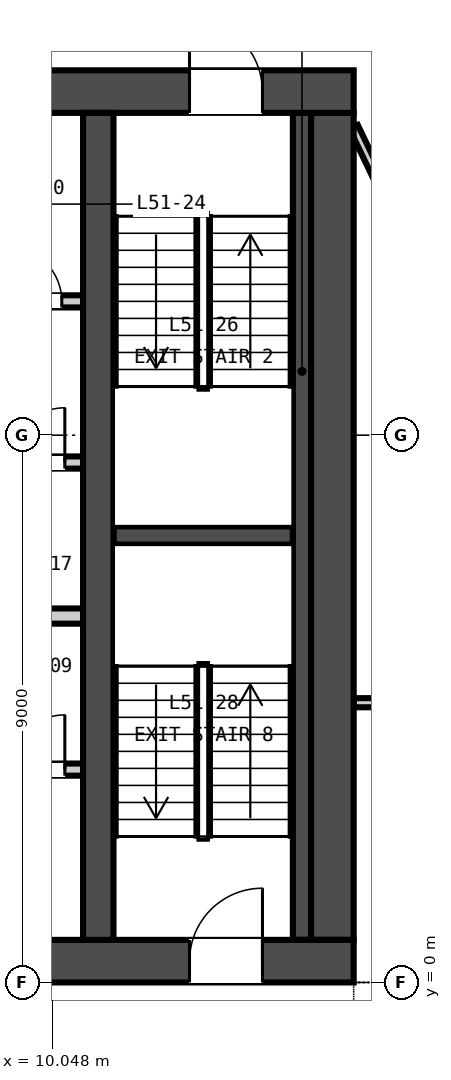
"""IFC4 building model, lengths in metres.
Left out: names, types, materials, properties, quantities, classifications, styles, units other than length and angle.
Written with IfcOpenShell. Run it as: python <this file> out.ifc"""

import sys

from ifc_helpers import new_model, si_unit, direction, frame, frame_2d, origin, place, context, subcontext, project, spatial, rectangle, extrude, element, fill, save


model = new_model("IFC4")
c1 = context("Model", 3, precision=1e-05, world=origin(), true_north=direction((0.0, 1.0)))
c2 = subcontext(c1, "Body", "Model", "MODEL_VIEW")
j1 = project(units=[si_unit("LENGTHUNIT", "METRE"), si_unit("PLANEANGLEUNIT", "RADIAN")], contexts=[c1])
p1 = place(None, origin())
s1 = spatial("IfcSite", under=j1, at=p1, CompositionType="ELEMENT")
p2 = place(p1, origin())
s2 = spatial("IfcBuilding", under=s1, at=p2, CompositionType="ELEMENT")
p3 = place(p2, frame((0.0, 0.0, 203.65)))
s3 = spatial("IfcBuildingStorey", under=s2, at=p3, CompositionType="ELEMENT", Elevation=203.65)
p4 = place(p3, frame((-15.0, 0.35, -0.15), z_axis=(0.0, 0.0, 1.0), x_axis=(1.0, 0.0, 0.0)))
e1 = element("IfcWall", 1, at=p4, inside=s3, PredefinedType="SOLIDWALL", context=c2, shape_type="SweptSolid", body=[
    extrude(rectangle(XDim=30.0, YDim=0.7, at=frame_2d((15.0, 0.0))), origin(), (0.0, 0.0, 1.0), 3.5),
])
p5 = place(p4, frame((5.8, 0.0, 0.15)))
e2 = element("IfcOpeningElement", 2, at=p5, cuts=e1, PredefinedType="OPENING", context=c2, shape_type="SweptSolid", body=[
    extrude(rectangle(XDim=2.4, YDim=2.4, at=frame_2d((1.2, 1.2))), frame((0.0, 0.36, 0.0), z_axis=(0.0, -1.0, 0.0), x_axis=(1.0, 0.0, 0.0)), (0.0, 0.0, 1.0), 0.72),
])
p6 = place(p4, frame((13.8, 0.0, 0.15)))
e3 = element("IfcOpeningElement", 3, at=p6, cuts=e1, PredefinedType="OPENING", context=c2, shape_type="SweptSolid", body=[
    extrude(rectangle(XDim=2.4, YDim=2.4, at=frame_2d((1.2, 1.2))), frame((0.0, 0.36, 0.0), z_axis=(0.0, -1.0, 0.0), x_axis=(1.0, 0.0, 0.0)), (0.0, 0.0, 1.0), 0.72),
])
p7 = place(p4, frame((21.8, 0.0, 0.15)))
e4 = element("IfcOpeningElement", 4, at=p7, cuts=e1, PredefinedType="OPENING", context=c2, shape_type="SweptSolid", body=[
    extrude(rectangle(XDim=2.4, YDim=2.4, at=frame_2d((1.2, 1.2))), frame((0.0, 0.36, 0.0), z_axis=(0.0, -1.0, 0.0), x_axis=(1.0, 0.0, 0.0)), (0.0, 0.0, 1.0), 0.72),
])
p8 = place(p4, frame((1.5, 0.0, 0.15)))
e5 = element("IfcOpeningElement", 5, at=p8, cuts=e1, PredefinedType="OPENING", context=c2, shape_type="SweptSolid", body=[
    extrude(rectangle(XDim=1.2, YDim=2.1, at=frame_2d((0.6, 1.05))), frame((0.0, 0.36, 0.0), z_axis=(0.0, -1.0, 0.0), x_axis=(1.0, 0.0, 0.0)), (0.0, 0.0, 1.0), 0.72),
])
p9 = place(p4, frame((27.3, 0.0, 0.15)))
e6 = element("IfcOpeningElement", 6, at=p9, cuts=e1, PredefinedType="OPENING", context=c2, shape_type="SweptSolid", body=[
    extrude(rectangle(XDim=1.2, YDim=2.1, at=frame_2d((0.6, 1.05))), frame((0.0, 0.36, 0.0), z_axis=(0.0, -1.0, 0.0), x_axis=(1.0, 0.0, 0.0)), (0.0, 0.0, 1.0), 0.72),
])
p10 = place(p3, frame((-15.0, 14.65, -0.15), z_axis=(0.0, 0.0, 1.0), x_axis=(1.0, 0.0, 0.0)))
e7 = element("IfcWall", 7, at=p10, inside=s3, PredefinedType="SOLIDWALL", context=c2, shape_type="SweptSolid", body=[
    extrude(rectangle(XDim=30.0, YDim=0.7, at=frame_2d((15.0, 0.0))), origin(), (0.0, 0.0, 1.0), 3.5),
])
p11 = place(p10, frame((9.25, 0.0, 0.15)))
e8 = element("IfcOpeningElement", 8, at=p11, cuts=e7, PredefinedType="OPENING", context=c2, shape_type="SweptSolid", body=[
    extrude(rectangle(XDim=1.5, YDim=2.1, at=frame_2d((0.75, 1.05))), frame((0.0, 0.36, 0.0), z_axis=(0.0, -1.0, 0.0), x_axis=(1.0, 0.0, 0.0)), (0.0, 0.0, 1.0), 0.72),
])
p12 = place(p10, frame((19.4, 0.0, 0.15)))
e9 = element("IfcOpeningElement", 9, at=p12, cuts=e7, PredefinedType="OPENING", context=c2, shape_type="SweptSolid", body=[
    extrude(rectangle(XDim=1.5, YDim=2.1, at=frame_2d((0.75, 1.05))), frame((0.0, 0.36, 0.0), z_axis=(0.0, -1.0, 0.0), x_axis=(1.0, 0.0, 0.0)), (0.0, 0.0, 1.0), 0.72),
])
p13 = place(p10, frame((1.5, 0.0, 0.15)))
e10 = element("IfcOpeningElement", 10, at=p13, cuts=e7, PredefinedType="OPENING", context=c2, shape_type="SweptSolid", body=[
    extrude(rectangle(XDim=1.2, YDim=2.1, at=frame_2d((0.6, 1.05))), frame((0.0, 0.36, 0.0), z_axis=(0.0, -1.0, 0.0), x_axis=(1.0, 0.0, 0.0)), (0.0, 0.0, 1.0), 0.72),
])
p14 = place(p10, frame((27.3, 0.0, 0.15)))
e11 = element("IfcOpeningElement", 11, at=p14, cuts=e7, PredefinedType="OPENING", context=c2, shape_type="SweptSolid", body=[
    extrude(rectangle(XDim=1.2, YDim=2.1, at=frame_2d((0.6, 1.05))), frame((0.0, 0.36, 0.0), z_axis=(0.0, -1.0, 0.0), x_axis=(1.0, 0.0, 0.0)), (0.0, 0.0, 1.0), 0.72),
])
p15 = place(p3, frame((14.65, 0.7, -0.15), z_axis=(0.0, 0.0, 1.0), x_axis=(0.0, 1.0, 0.0)))
e12 = element("IfcWall", 12, at=p15, inside=s3, PredefinedType="SOLIDWALL", context=c2, shape_type="SweptSolid", body=[
    extrude(rectangle(XDim=13.6, YDim=0.7, at=frame_2d((6.8, 0.0))), origin(), (0.0, 0.0, 1.0), 3.5),
])
p16 = place(p3, frame((10.8, 0.7, -0.15), z_axis=(0.0, 0.0, 1.0), x_axis=(0.0, 1.0, 0.0)))
e13 = element("IfcWall", 13, at=p16, inside=s3, PredefinedType="SOLIDWALL", context=c2, shape_type="SweptSolid", body=[
    extrude(rectangle(XDim=13.6, YDim=0.5, at=frame_2d((6.8, 0.0))), origin(), (0.0, 0.0, 1.0), 3.5),
])
p17 = place(p3, frame((-10.55, 3.5, 0.0), z_axis=(0.0, 0.0, 1.0), x_axis=(1.0, 0.0, 0.0)))
e14 = element("IfcWall", 14, at=p17, inside=s3, PredefinedType="PARTITIONING", context=c2, shape_type="SweptSolid", body=[
    extrude(rectangle(XDim=21.1, YDim=0.2, at=frame_2d((10.55, 0.0))), origin(), (0.0, 0.0, 1.0), 3.35),
])
p18 = place(p17, frame((1.113, 0.0, 0.0)))
e15 = element("IfcOpeningElement", 15, at=p18, cuts=e14, PredefinedType="OPENING", context=c2, shape_type="SweptSolid", body=[
    extrude(rectangle(XDim=1.0, YDim=2.1, at=frame_2d((0.5, 1.05))), frame((0.0, 0.11, 0.0), z_axis=(0.0, -1.0, 0.0), x_axis=(1.0, 0.0, 0.0)), (0.0, 0.0, 1.0), 0.22),
])
p19 = place(p17, frame((5.15, 0.0, 0.0)))
e16 = element("IfcOpeningElement", 16, at=p19, cuts=e14, PredefinedType="OPENING", context=c2, shape_type="SweptSolid", body=[
    extrude(rectangle(XDim=1.0, YDim=2.1, at=frame_2d((0.5, 1.05))), frame((0.0, 0.11, 0.0), z_axis=(0.0, -1.0, 0.0), x_axis=(1.0, 0.0, 0.0)), (0.0, 0.0, 1.0), 0.22),
])
p20 = place(p17, frame((9.85, 0.0, 0.0)))
e17 = element("IfcOpeningElement", 17, at=p20, cuts=e14, PredefinedType="OPENING", context=c2, shape_type="SweptSolid", body=[
    extrude(rectangle(XDim=1.0, YDim=2.1, at=frame_2d((0.5, 1.05))), frame((0.0, 0.11, 0.0), z_axis=(0.0, -1.0, 0.0), x_axis=(1.0, 0.0, 0.0)), (0.0, 0.0, 1.0), 0.22),
])
p21 = place(p17, frame((13.4, 0.0, 0.0)))
e18 = element("IfcOpeningElement", 18, at=p21, cuts=e14, PredefinedType="OPENING", context=c2, shape_type="SweptSolid", body=[
    extrude(rectangle(XDim=1.0, YDim=2.1, at=frame_2d((0.5, 1.05))), frame((0.0, 0.11, 0.0), z_axis=(0.0, -1.0, 0.0), x_axis=(1.0, 0.0, 0.0)), (0.0, 0.0, 1.0), 0.22),
])
p22 = place(p17, frame((16.762, 0.0, 0.0)))
e19 = element("IfcOpeningElement", 19, at=p22, cuts=e14, PredefinedType="OPENING", context=c2, shape_type="SweptSolid", body=[
    extrude(rectangle(XDim=1.0, YDim=2.1, at=frame_2d((0.5, 1.05))), frame((0.0, 0.11, 0.0), z_axis=(0.0, -1.0, 0.0), x_axis=(1.0, 0.0, 0.0)), (0.0, 0.0, 1.0), 0.22),
])
p23 = place(p17, frame((19.9, 0.0, 0.0)))
e20 = element("IfcOpeningElement", 20, at=p23, cuts=e14, PredefinedType="OPENING", context=c2, shape_type="SweptSolid", body=[
    extrude(rectangle(XDim=0.9, YDim=2.1, at=frame_2d((0.45, 1.05))), frame((0.0, 0.11, 0.0), z_axis=(0.0, -1.0, 0.0), x_axis=(1.0, 0.0, 0.0)), (0.0, 0.0, 1.0), 0.22),
])
p24 = place(p3, frame((-10.55, 6.025, 0.0), z_axis=(0.0, 0.0, 1.0), x_axis=(1.0, 0.0, 0.0)))
e21 = element("IfcWall", 21, at=p24, inside=s3, PredefinedType="PARTITIONING", context=c2, shape_type="SweptSolid", body=[
    extrude(rectangle(XDim=21.1, YDim=0.25, at=frame_2d((10.55, 0.0))), origin(), (0.0, 0.0, 1.0), 3.35),
])
p25 = place(p3, frame((-10.55, 8.55, 0.0), z_axis=(0.0, 0.0, 1.0), x_axis=(1.0, 0.0, 0.0)))
e22 = element("IfcWall", 22, at=p25, inside=s3, PredefinedType="PARTITIONING", context=c2, shape_type="SweptSolid", body=[
    extrude(rectangle(XDim=21.1, YDim=0.2, at=frame_2d((10.55, 0.0))), origin(), (0.0, 0.0, 1.0), 3.35),
])
p26 = place(p25, frame((0.675, 0.0, 0.0)))
e23 = element("IfcOpeningElement", 23, at=p26, cuts=e22, PredefinedType="OPENING", context=c2, shape_type="SweptSolid", body=[
    extrude(rectangle(XDim=1.2, YDim=2.1, at=frame_2d((0.6, 1.05))), frame((0.0, 0.11, 0.0), z_axis=(0.0, -1.0, 0.0), x_axis=(1.0, 0.0, 0.0)), (0.0, 0.0, 1.0), 0.22),
])
p27 = place(p25, frame((3.475, 0.0, 0.0)))
e24 = element("IfcOpeningElement", 24, at=p27, cuts=e22, PredefinedType="OPENING", context=c2, shape_type="SweptSolid", body=[
    extrude(rectangle(XDim=1.2, YDim=2.1, at=frame_2d((0.6, 1.05))), frame((0.0, 0.11, 0.0), z_axis=(0.0, -1.0, 0.0), x_axis=(1.0, 0.0, 0.0)), (0.0, 0.0, 1.0), 0.22),
])
p28 = place(p25, frame((6.275, 0.0, 0.0)))
e25 = element("IfcOpeningElement", 25, at=p28, cuts=e22, PredefinedType="OPENING", context=c2, shape_type="SweptSolid", body=[
    extrude(rectangle(XDim=1.2, YDim=2.1, at=frame_2d((0.6, 1.05))), frame((0.0, 0.11, 0.0), z_axis=(0.0, -1.0, 0.0), x_axis=(1.0, 0.0, 0.0)), (0.0, 0.0, 1.0), 0.22),
])
p29 = place(p25, frame((9.075, 0.0, 0.0)))
e26 = element("IfcOpeningElement", 26, at=p29, cuts=e22, PredefinedType="OPENING", context=c2, shape_type="SweptSolid", body=[
    extrude(rectangle(XDim=1.2, YDim=2.1, at=frame_2d((0.6, 1.05))), frame((0.0, 0.11, 0.0), z_axis=(0.0, -1.0, 0.0), x_axis=(1.0, 0.0, 0.0)), (0.0, 0.0, 1.0), 0.22),
])
p30 = place(p25, frame((11.875, 0.0, 0.0)))
e27 = element("IfcOpeningElement", 27, at=p30, cuts=e22, PredefinedType="OPENING", context=c2, shape_type="SweptSolid", body=[
    extrude(rectangle(XDim=1.2, YDim=2.1, at=frame_2d((0.6, 1.05))), frame((0.0, 0.11, 0.0), z_axis=(0.0, -1.0, 0.0), x_axis=(1.0, 0.0, 0.0)), (0.0, 0.0, 1.0), 0.22),
])
p31 = place(p25, frame((14.675, 0.0, 0.0)))
e28 = element("IfcOpeningElement", 28, at=p31, cuts=e22, PredefinedType="OPENING", context=c2, shape_type="SweptSolid", body=[
    extrude(rectangle(XDim=1.2, YDim=2.1, at=frame_2d((0.6, 1.05))), frame((0.0, 0.11, 0.0), z_axis=(0.0, -1.0, 0.0), x_axis=(1.0, 0.0, 0.0)), (0.0, 0.0, 1.0), 0.22),
])
p32 = place(p25, frame((17.475, 0.0, 0.0)))
e29 = element("IfcOpeningElement", 29, at=p32, cuts=e22, PredefinedType="OPENING", context=c2, shape_type="SweptSolid", body=[
    extrude(rectangle(XDim=1.2, YDim=2.1, at=frame_2d((0.6, 1.05))), frame((0.0, 0.11, 0.0), z_axis=(0.0, -1.0, 0.0), x_axis=(1.0, 0.0, 0.0)), (0.0, 0.0, 1.0), 0.22),
])
p33 = place(p25, frame((19.9, 0.0, 0.0)))
e30 = element("IfcOpeningElement", 30, at=p33, cuts=e22, PredefinedType="OPENING", context=c2, shape_type="SweptSolid", body=[
    extrude(rectangle(XDim=0.9, YDim=2.1, at=frame_2d((0.45, 1.05))), frame((0.0, 0.11, 0.0), z_axis=(0.0, -1.0, 0.0), x_axis=(1.0, 0.0, 0.0)), (0.0, 0.0, 1.0), 0.22),
])
p34 = place(p3, frame((5.9, 11.2, 0.0), z_axis=(0.0, 0.0, 1.0), x_axis=(1.0, 0.0, 0.0)))
e31 = element("IfcWall", 31, at=p34, inside=s3, PredefinedType="PARTITIONING", context=c2, shape_type="SweptSolid", body=[
    extrude(rectangle(XDim=4.65, YDim=0.2, at=frame_2d((2.325, 0.0))), origin(), (0.0, 0.0, 1.0), 3.35),
])
p35 = place(p34, frame((3.4, 0.0, 0.0)))
e32 = element("IfcOpeningElement", 32, at=p35, cuts=e31, PredefinedType="OPENING", context=c2, shape_type="SweptSolid", body=[
    extrude(rectangle(XDim=0.9, YDim=2.1, at=frame_2d((0.45, 1.05))), frame((0.0, 0.11, 0.0), z_axis=(0.0, -1.0, 0.0), x_axis=(1.0, 0.0, 0.0)), (0.0, 0.0, 1.0), 0.22),
])
p36 = place(p3, frame((11.05, 7.35, 0.0), z_axis=(0.0, 0.0, 1.0), x_axis=(1.0, 0.0, 0.0)))
e33 = element("IfcWall", 33, at=p36, inside=s3, PredefinedType="SOLIDWALL", context=c2, shape_type="SweptSolid", body=[
    extrude(rectangle(XDim=2.95, YDim=0.3, at=frame_2d((1.475, 0.0))), origin(), (0.0, 0.0, 1.0), 3.35),
])
p37 = place(p3, frame((14.15, 0.7, 0.0), z_axis=(0.0, 0.0, 1.0), x_axis=(0.0, 1.0, 0.0)))
e34 = element("IfcWall", 34, at=p37, inside=s3, PredefinedType="SOLIDWALL", context=c2, shape_type="SweptSolid", body=[
    extrude(rectangle(XDim=13.6, YDim=0.3, at=frame_2d((6.8, 0.0))), origin(), (0.0, 0.0, 1.0), 3.35),
])
p38 = place(p3, frame((19.493, 4.675, 0.0), z_axis=(0.0, 0.0, 1.0), x_axis=(-0.43146462293, 0.902129857149, 0.0)))
e35 = element("IfcWall", 35, at=p38, inside=s3, PredefinedType="PARTITIONING", context=c2, shape_type="SweptSolid", body=[
    extrude(rectangle(XDim=10.413, YDim=0.15, at=frame_2d((5.207, 0.0))), origin(), (0.0, 0.0, 1.0), 2.591),
])
p39 = place(p38, frame((4.698, 0.0, 0.0)))
e36 = element("IfcOpeningElement", 36, at=p39, cuts=e35, PredefinedType="OPENING", context=c2, shape_type="SweptSolid", body=[
    extrude(rectangle(XDim=1.0, YDim=2.1, at=frame_2d((0.5, 1.05))), frame((0.0, 0.085, 0.0), z_axis=(0.0, -1.0, 0.0), x_axis=(1.0, 0.0, 0.0)), (0.0, 0.0, 1.0), 0.17),
])
p40 = place(p3, frame((15.0, 4.6, 0.0), z_axis=(0.0, 0.0, 1.0), x_axis=(1.0, 0.0, 0.0)))
e37 = element("IfcWall", 37, at=p40, inside=s3, PredefinedType="PARTITIONING", context=c2, shape_type="SweptSolid", body=[
    extrude(rectangle(XDim=4.5, YDim=0.15, at=frame_2d((2.25, 0.0))), origin(), (0.0, 0.0, 1.0), 2.591),
])
p41 = place(p23, origin())
e38 = element("IfcDoor", 38, at=p41, inside=s3, OperationType="SINGLE_SWING_RIGHT", PredefinedType="DOOR", context=c2, shape_type="SweptSolid", body=[
    extrude(rectangle(XDim=0.9, YDim=2.1, at=frame_2d((0.45, 1.05))), frame((0.0, 0.025, 0.0), z_axis=(0.0, -1.0, 0.0), x_axis=(1.0, 0.0, 0.0)), (0.0, 0.0, 1.0), 0.05),
])
fill(e20, e38)
p42 = place(p33, origin())
e39 = element("IfcDoor", 39, at=p42, inside=s3, OperationType="SINGLE_SWING_RIGHT", PredefinedType="DOOR", context=c2, shape_type="SweptSolid", body=[
    extrude(rectangle(XDim=0.9, YDim=2.1, at=frame_2d((0.45, 1.05))), frame((0.0, 0.025, 0.0), z_axis=(0.0, -1.0, 0.0), x_axis=(1.0, 0.0, 0.0)), (0.0, 0.0, 1.0), 0.05),
])
fill(e30, e39)
p43 = place(p35, origin())
e40 = element("IfcDoor", 40, at=p43, inside=s3, OperationType="SINGLE_SWING_LEFT", PredefinedType="DOOR", context=c2, shape_type="SweptSolid", body=[
    extrude(rectangle(XDim=0.9, YDim=2.1, at=frame_2d((0.45, 1.05))), frame((0.0, 0.025, 0.0), z_axis=(0.0, -1.0, 0.0), x_axis=(1.0, 0.0, 0.0)), (0.0, 0.0, 1.0), 0.05),
])
fill(e32, e40)
p44 = place(p14, origin())
e41 = element("IfcDoor", 41, at=p44, inside=s3, OperationType="SINGLE_SWING_LEFT", PredefinedType="DOOR", context=c2, shape_type="SweptSolid", body=[
    extrude(rectangle(XDim=1.2, YDim=2.1, at=frame_2d((0.6, 1.05))), frame((0.0, 0.025, 0.0), z_axis=(0.0, -1.0, 0.0), x_axis=(1.0, 0.0, 0.0)), (0.0, 0.0, 1.0), 0.05),
])
fill(e11, e41)
p45 = place(p9, origin())
e42 = element("IfcDoor", 42, at=p45, inside=s3, OperationType="SINGLE_SWING_RIGHT", PredefinedType="DOOR", context=c2, shape_type="SweptSolid", body=[
    extrude(rectangle(XDim=1.2, YDim=2.1, at=frame_2d((0.6, 1.05))), frame((0.0, 0.025, 0.0), z_axis=(0.0, -1.0, 0.0), x_axis=(1.0, 0.0, 0.0)), (0.0, 0.0, 1.0), 0.05),
])
fill(e6, e42)
save(model, sys.argv[1])
